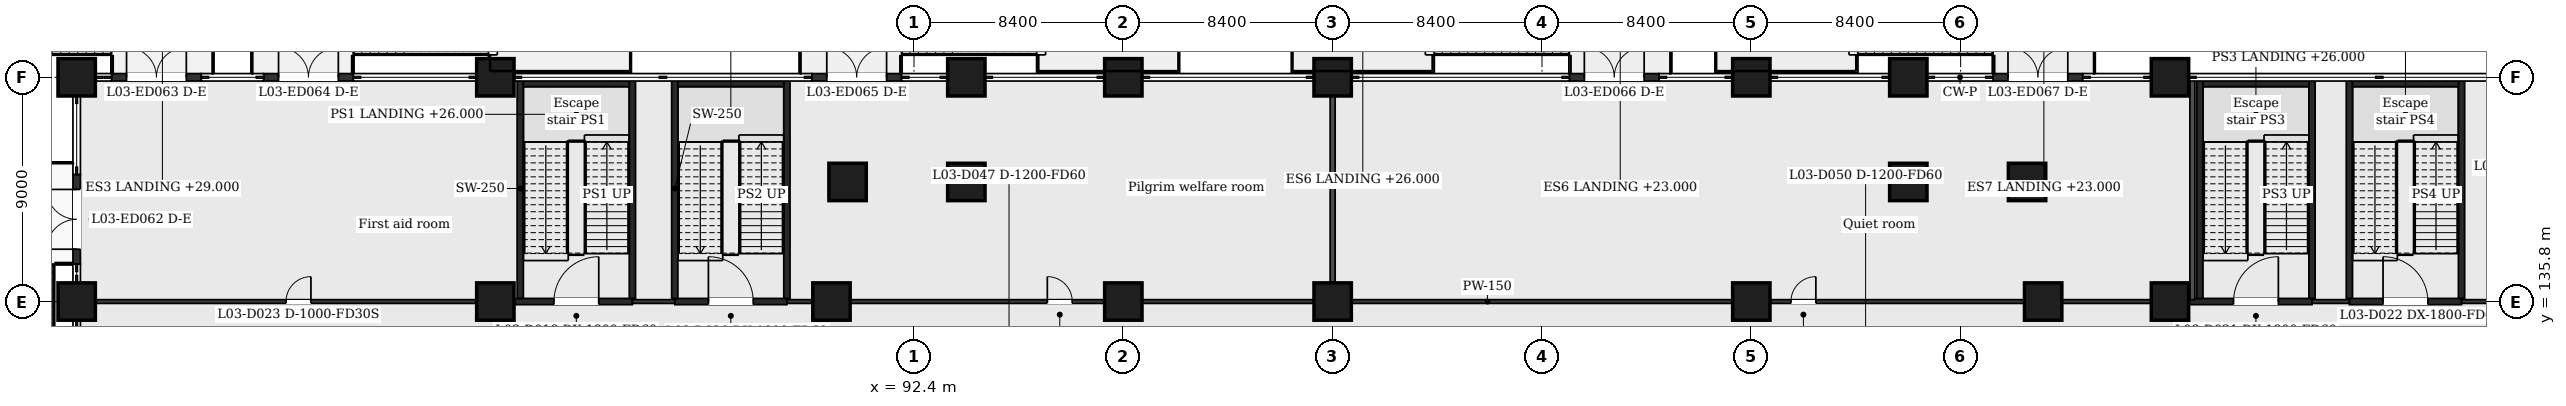
"""IFC4 building model, lengths in metres.
Left out: names, types, materials, properties, quantities, classifications, styles, units other than length and angle.
Written with IfcOpenShell. Run it as: python <this file> out.ifc"""

import sys

from ifc_helpers import new_model, si_unit, direction, frame, frame_2d, origin, origin_2d, place, context, subcontext, project, spatial, rectangle, extrude, element, fill, save


model = new_model("IFC4")
c1 = context("Model", 3, precision=1e-05, world=origin(), true_north=direction((0.0, 1.0)))
c2 = subcontext(c1, "Body", "Model", "MODEL_VIEW")
j1 = project(units=[si_unit("LENGTHUNIT", "METRE"), si_unit("PLANEANGLEUNIT", "RADIAN")], contexts=[c1])
p1 = place(None, origin())
s1 = spatial("IfcSite", under=j1, at=p1, CompositionType="ELEMENT")
p2 = place(p1, origin())
s2 = spatial("IfcBuilding", under=s1, at=p2, CompositionType="ELEMENT")
p3 = place(p2, frame((0.0, 0.0, 23.0)))
s3 = spatial("IfcBuildingStorey", under=s2, at=p3, CompositionType="ELEMENT", Elevation=23.0)
for number, where, z_axis, x_axis in (
    (1, (58.8, 135.8, 0.0), (0.0, 0.0, 1.0), (1.0, 0.0, 0.0)),
    (2, (75.6, 135.8, 0.0), (0.0, 0.0, 1.0), (1.0, 0.0, 0.0)),
    (3, (89.088, 135.8, 0.0), (0.0, 0.0, 1.0), (1.0, 0.0, 0.0)),
    (4, (100.8, 135.8, 0.0), (0.0, 0.0, 1.0), (1.0, 0.0, 0.0)),
    (5, (109.2, 135.8, 0.0), (0.0, 0.0, 1.0), (1.0, 0.0, 0.0)),
    (6, (126.0, 135.8, 0.0), (0.0, 0.0, 1.0), (1.0, 0.0, 0.0)),
    (7, (137.711, 135.8, 0.0), (0.0, 0.0, 1.0), (1.0, 0.0, 0.0)),
    (8, (142.8, 135.8, 0.0), (0.0, 0.0, 1.0), (1.0, 0.0, 0.0)),
    (9, (89.735, 140.6, 0.0), (0.0, 0.0, 1.0), (1.0, 0.0, 0.0)),
    (10, (94.5, 140.6, 0.0), (0.0, 0.0, 1.0), (1.0, 0.0, 0.0)),
    (11, (132.3, 140.6, 0.0), (0.0, 0.0, 1.0), (1.0, 0.0, 0.0)),
    (12, (137.065, 140.6, 0.0), (0.0, 0.0, 1.0), (1.0, 0.0, 0.0)),
    (13, (58.8, 144.8, 0.0), (0.0, 0.0, 1.0), (1.0, 0.0, 0.0)),
    (14, (75.6, 144.8, 0.0), (0.0, 0.0, 1.0), (1.0, 0.0, 0.0)),
    (15, (94.5, 144.8, 0.0), (0.0, 0.0, 1.0), (1.0, 0.0, 0.0)),
    (16, (100.8, 144.8, 0.0), (0.0, 0.0, 1.0), (1.0, 0.0, 0.0)),
    (17, (109.2, 144.8, 0.0), (0.0, 0.0, 1.0), (1.0, 0.0, 0.0)),
    (18, (126.0, 144.8, 0.0), (0.0, 0.0, 1.0), (1.0, 0.0, 0.0)),
    (19, (132.3, 144.8, 0.0), (0.0, 0.0, 1.0), (1.0, 0.0, 0.0)),
    (20, (142.8, 144.8, 0.0), (0.0, 0.0, 1.0), (1.0, 0.0, 0.0)),
):
    element("IfcColumn", number, at=place(p3, frame(where, z_axis=z_axis, x_axis=x_axis)), inside=s3, PredefinedType="COLUMN", context=c2, shape_type="SweptSolid", body=[
        extrude(rectangle(XDim=1.5, YDim=1.5, at=origin_2d()), origin(), (0.0, 0.0, 1.0), 6.0),
    ])
p4 = place(p3, frame((58.8, 137.3, 0.0), z_axis=(0.0, 0.0, 1.0), x_axis=(0.0, 1.0, 0.0)))
e21 = element("IfcWall", 21, at=p4, inside=s3, PredefinedType="SOLIDWALL", context=c2, shape_type="SweptSolid", body=[
    extrude(rectangle(XDim=3.6, YDim=0.3, at=frame_2d((1.8, 0.0))), origin(), (0.0, 0.0, 1.0), 5.1),
])
p5 = place(p4, frame((0.6, 0.0, 0.0)))
e22 = element("IfcOpeningElement", 22, at=p5, cuts=e21, PredefinedType="OPENING", context=c2, shape_type="SweptSolid", body=[
    extrude(rectangle(XDim=2.4, YDim=2.4, at=frame_2d((1.2, 1.2))), frame((0.0, 0.16, 0.0), z_axis=(0.0, -1.0, 0.0), x_axis=(1.0, 0.0, 0.0)), (0.0, 0.0, 1.0), 0.32),
])
p6 = place(p3, frame((60.2, 144.8, 0.0), z_axis=(0.0, 0.0, 1.0), x_axis=(1.0, 0.0, 0.0)))
e23 = element("IfcWall", 23, at=p6, inside=s3, PredefinedType="SOLIDWALL", context=c2, shape_type="SweptSolid", body=[
    extrude(rectangle(XDim=3.6, YDim=0.3, at=frame_2d((1.8, 0.0))), origin(), (0.0, 0.0, 1.0), 5.1),
])
p7 = place(p6, frame((0.6, 0.0, 0.0)))
e24 = element("IfcOpeningElement", 24, at=p7, cuts=e23, PredefinedType="OPENING", context=c2, shape_type="SweptSolid", body=[
    extrude(rectangle(XDim=2.4, YDim=2.4, at=frame_2d((1.2, 1.2))), frame((0.0, 0.16, 0.0), z_axis=(0.0, -1.0, 0.0), x_axis=(1.0, 0.0, 0.0)), (0.0, 0.0, 1.0), 0.32),
])
p8 = place(p3, frame((66.3, 144.8, 0.0), z_axis=(0.0, 0.0, 1.0), x_axis=(1.0, 0.0, 0.0)))
e25 = element("IfcWall", 25, at=p8, inside=s3, PredefinedType="SOLIDWALL", context=c2, shape_type="SweptSolid", body=[
    extrude(rectangle(XDim=3.6, YDim=0.3, at=frame_2d((1.8, 0.0))), origin(), (0.0, 0.0, 1.0), 5.1),
])
p9 = place(p8, frame((0.6, 0.0, 0.0)))
e26 = element("IfcOpeningElement", 26, at=p9, cuts=e25, PredefinedType="OPENING", context=c2, shape_type="SweptSolid", body=[
    extrude(rectangle(XDim=2.4, YDim=2.4, at=frame_2d((1.2, 1.2))), frame((0.0, 0.16, 0.0), z_axis=(0.0, -1.0, 0.0), x_axis=(1.0, 0.0, 0.0)), (0.0, 0.0, 1.0), 0.32),
])
p10 = place(p3, frame((88.3, 144.8, 0.0), z_axis=(0.0, 0.0, 1.0), x_axis=(1.0, 0.0, 0.0)))
e27 = element("IfcWall", 27, at=p10, inside=s3, PredefinedType="SOLIDWALL", context=c2, shape_type="SweptSolid", body=[
    extrude(rectangle(XDim=3.6, YDim=0.3, at=frame_2d((1.8, 0.0))), origin(), (0.0, 0.0, 1.0), 5.1),
])
p11 = place(p10, frame((0.6, 0.0, 0.0)))
e28 = element("IfcOpeningElement", 28, at=p11, cuts=e27, PredefinedType="OPENING", context=c2, shape_type="SweptSolid", body=[
    extrude(rectangle(XDim=2.4, YDim=2.4, at=frame_2d((1.2, 1.2))), frame((0.0, 0.16, 0.0), z_axis=(0.0, -1.0, 0.0), x_axis=(1.0, 0.0, 0.0)), (0.0, 0.0, 1.0), 0.32),
])
p12 = place(p3, frame((118.7, 144.8, 0.0), z_axis=(0.0, 0.0, 1.0), x_axis=(1.0, 0.0, 0.0)))
e29 = element("IfcWall", 29, at=p12, inside=s3, PredefinedType="SOLIDWALL", context=c2, shape_type="SweptSolid", body=[
    extrude(rectangle(XDim=3.6, YDim=0.3, at=frame_2d((1.8, 0.0))), origin(), (0.0, 0.0, 1.0), 5.1),
])
p13 = place(p12, frame((0.6, 0.0, 0.0)))
e30 = element("IfcOpeningElement", 30, at=p13, cuts=e29, PredefinedType="OPENING", context=c2, shape_type="SweptSolid", body=[
    extrude(rectangle(XDim=2.4, YDim=2.4, at=frame_2d((1.2, 1.2))), frame((0.0, 0.16, 0.0), z_axis=(0.0, -1.0, 0.0), x_axis=(1.0, 0.0, 0.0)), (0.0, 0.0, 1.0), 0.32),
])
p14 = place(p3, frame((135.7, 144.8, 0.0), z_axis=(0.0, 0.0, 1.0), x_axis=(1.0, 0.0, 0.0)))
e31 = element("IfcWall", 31, at=p14, inside=s3, PredefinedType="SOLIDWALL", context=c2, shape_type="SweptSolid", body=[
    extrude(rectangle(XDim=3.6, YDim=0.3, at=frame_2d((1.8, 0.0))), origin(), (0.0, 0.0, 1.0), 5.1),
])
p15 = place(p14, frame((0.6, 0.0, 0.0)))
e32 = element("IfcOpeningElement", 32, at=p15, cuts=e31, PredefinedType="OPENING", context=c2, shape_type="SweptSolid", body=[
    extrude(rectangle(XDim=2.4, YDim=2.4, at=frame_2d((1.2, 1.2))), frame((0.0, 0.16, 0.0), z_axis=(0.0, -1.0, 0.0), x_axis=(1.0, 0.0, 0.0)), (0.0, 0.0, 1.0), 0.32),
])
p16 = place(p3, frame((76.32, 135.8, 0.0), z_axis=(0.0, 0.0, 1.0), x_axis=(1.0, 0.0, 0.0)))
e33 = element("IfcWall", 33, at=p16, inside=s3, PredefinedType="PARTITIONING", context=c2, shape_type="SweptSolid", body=[
    extrude(rectangle(XDim=4.78, YDim=0.25, at=frame_2d((2.39, 0.0))), origin(), (0.0, 0.0, 1.0), 5.5),
])
p17 = place(p16, frame((1.63, 0.0, 0.0)))
e34 = element("IfcOpeningElement", 34, at=p17, cuts=e33, PredefinedType="OPENING", context=c2, shape_type="SweptSolid", body=[
    extrude(rectangle(XDim=1.8, YDim=2.1, at=frame_2d((0.9, 1.05))), frame((0.0, 0.135, 0.0), z_axis=(0.0, -1.0, 0.0), x_axis=(1.0, 0.0, 0.0)), (0.0, 0.0, 1.0), 0.27),
])
p18 = place(p3, frame((82.8, 135.8, 0.0), z_axis=(0.0, 0.0, 1.0), x_axis=(1.0, 0.0, 0.0)))
e35 = element("IfcWall", 35, at=p18, inside=s3, PredefinedType="PARTITIONING", context=c2, shape_type="SweptSolid", body=[
    extrude(rectangle(XDim=4.5, YDim=0.25, at=frame_2d((2.25, 0.0))), origin(), (0.0, 0.0, 1.0), 5.5),
])
p19 = place(p18, frame((1.35, 0.0, 0.0)))
e36 = element("IfcOpeningElement", 36, at=p19, cuts=e35, PredefinedType="OPENING", context=c2, shape_type="SweptSolid", body=[
    extrude(rectangle(XDim=1.8, YDim=2.1, at=frame_2d((0.9, 1.05))), frame((0.0, 0.135, 0.0), z_axis=(0.0, -1.0, 0.0), x_axis=(1.0, 0.0, 0.0)), (0.0, 0.0, 1.0), 0.27),
])
p20 = place(p3, frame((143.52, 135.8, 0.0), z_axis=(0.0, 0.0, 1.0), x_axis=(1.0, 0.0, 0.0)))
e37 = element("IfcWall", 37, at=p20, inside=s3, PredefinedType="PARTITIONING", context=c2, shape_type="SweptSolid", body=[
    extrude(rectangle(XDim=4.98, YDim=0.25, at=frame_2d((2.49, 0.0))), origin(), (0.0, 0.0, 1.0), 5.5),
])
p21 = place(p20, frame((1.83, 0.0, 0.0)))
e38 = element("IfcOpeningElement", 38, at=p21, cuts=e37, PredefinedType="OPENING", context=c2, shape_type="SweptSolid", body=[
    extrude(rectangle(XDim=1.8, YDim=2.1, at=frame_2d((0.9, 1.05))), frame((0.0, 0.135, 0.0), z_axis=(0.0, -1.0, 0.0), x_axis=(1.0, 0.0, 0.0)), (0.0, 0.0, 1.0), 0.27),
])
p22 = place(p3, frame((150.0, 135.8, 0.0), z_axis=(0.0, 0.0, 1.0), x_axis=(1.0, 0.0, 0.0)))
e39 = element("IfcWall", 39, at=p22, inside=s3, PredefinedType="PARTITIONING", context=c2, shape_type="SweptSolid", body=[
    extrude(rectangle(XDim=4.5, YDim=0.25, at=frame_2d((2.25, 0.0))), origin(), (0.0, 0.0, 1.0), 5.5),
])
p23 = place(p22, frame((1.35, 0.0, 0.0)))
e40 = element("IfcOpeningElement", 40, at=p23, cuts=e39, PredefinedType="OPENING", context=c2, shape_type="SweptSolid", body=[
    extrude(rectangle(XDim=1.8, YDim=2.1, at=frame_2d((0.9, 1.05))), frame((0.0, 0.135, 0.0), z_axis=(0.0, -1.0, 0.0), x_axis=(1.0, 0.0, 0.0)), (0.0, 0.0, 1.0), 0.27),
])
p24 = place(p3, frame((58.85, 135.8, 0.0), z_axis=(0.0, 0.0, 1.0), x_axis=(1.0, 0.0, 0.0)))
e41 = element("IfcWall", 41, at=p24, inside=s3, PredefinedType="PARTITIONING", context=c2, shape_type="SweptSolid", body=[
    extrude(rectangle(XDim=17.47, YDim=0.15, at=frame_2d((8.735, 0.0))), origin(), (0.0, 0.0, 1.0), 5.5),
])
p25 = place(p24, frame((8.35, 0.0, 0.0)))
e42 = element("IfcOpeningElement", 42, at=p25, cuts=e41, PredefinedType="OPENING", context=c2, shape_type="SweptSolid", body=[
    extrude(rectangle(XDim=1.0, YDim=2.1, at=frame_2d((0.5, 1.05))), frame((0.0, 0.085, 0.0), z_axis=(0.0, -1.0, 0.0), x_axis=(1.0, 0.0, 0.0)), (0.0, 0.0, 1.0), 0.17),
])
p26 = place(p3, frame((81.1, 135.8, 0.0), z_axis=(0.0, 0.0, 1.0), x_axis=(1.0, 0.0, 0.0)))
e43 = element("IfcWall", 43, at=p26, inside=s3, PredefinedType="PARTITIONING", context=c2, shape_type="SweptSolid", body=[
    extrude(rectangle(XDim=1.7, YDim=0.15, at=frame_2d((0.85, 0.0))), origin(), (0.0, 0.0, 1.0), 5.5),
])
p27 = place(p3, frame((87.3, 135.8, 0.0), z_axis=(0.0, 0.0, 1.0), x_axis=(1.0, 0.0, 0.0)))
e44 = element("IfcWall", 44, at=p27, inside=s3, PredefinedType="PARTITIONING", context=c2, shape_type="SweptSolid", body=[
    extrude(rectangle(XDim=56.22, YDim=0.15, at=frame_2d((28.11, 0.0))), origin(), (0.0, 0.0, 1.0), 5.5),
])
p28 = place(p27, frame((10.45, 0.0, 0.0)))
e45 = element("IfcOpeningElement", 45, at=p28, cuts=e44, PredefinedType="OPENING", context=c2, shape_type="SweptSolid", body=[
    extrude(rectangle(XDim=1.0, YDim=2.1, at=frame_2d((0.5, 1.05))), frame((0.0, 0.085, 0.0), z_axis=(0.0, -1.0, 0.0), x_axis=(1.0, 0.0, 0.0)), (0.0, 0.0, 1.0), 0.17),
])
p29 = place(p27, frame((40.29, 0.0, 0.0)))
e46 = element("IfcOpeningElement", 46, at=p29, cuts=e44, PredefinedType="OPENING", context=c2, shape_type="SweptSolid", body=[
    extrude(rectangle(XDim=1.0, YDim=2.1, at=frame_2d((0.5, 1.05))), frame((0.0, 0.085, 0.0), z_axis=(0.0, -1.0, 0.0), x_axis=(1.0, 0.0, 0.0)), (0.0, 0.0, 1.0), 0.17),
])
p30 = place(p3, frame((148.5, 135.8, 0.0), z_axis=(0.0, 0.0, 1.0), x_axis=(1.0, 0.0, 0.0)))
e47 = element("IfcWall", 47, at=p30, inside=s3, PredefinedType="PARTITIONING", context=c2, shape_type="SweptSolid", body=[
    extrude(rectangle(XDim=1.5, YDim=0.15, at=frame_2d((0.75, 0.0))), origin(), (0.0, 0.0, 1.0), 5.5),
])
p31 = place(p3, frame((154.5, 135.8, 0.0), z_axis=(0.0, 0.0, 1.0), x_axis=(1.0, 0.0, 0.0)))
e48 = element("IfcWall", 48, at=p31, inside=s3, PredefinedType="PARTITIONING", context=c2, shape_type="SweptSolid", body=[
    extrude(rectangle(XDim=5.05, YDim=0.15, at=frame_2d((2.525, 0.0))), origin(), (0.0, 0.0, 1.0), 5.5),
])
for number, where, z_axis, x_axis in (
    (49, (76.6, 135.925, 0.0), (0.0, 0.0, 1.0), (0.0, 1.0, 0.0)),
    (50, (81.1, 135.925, 0.0), (0.0, 0.0, 1.0), (0.0, 1.0, 0.0)),
    (51, (82.8, 135.925, 0.0), (0.0, 0.0, 1.0), (0.0, 1.0, 0.0)),
    (52, (87.3, 135.925, 0.0), (0.0, 0.0, 1.0), (0.0, 1.0, 0.0)),
):
    element("IfcWall", number, at=place(p3, frame(where, z_axis=z_axis, x_axis=x_axis)), inside=s3, PredefinedType="PARTITIONING", context=c2, shape_type="SweptSolid", body=[
        extrude(rectangle(XDim=8.825, YDim=0.25, at=frame_2d((4.413, 0.0))), origin(), (0.0, 0.0, 1.0), 5.5),
    ])
for number, where, z_axis, x_axis in (
    (53, (109.2, 135.875, 0.0), (0.0, 0.0, 1.0), (0.0, 1.0, 0.0)),
    (54, (143.7, 135.875, 0.0), (0.0, 0.0, 1.0), (0.0, 1.0, 0.0)),
):
    element("IfcWall", number, at=place(p3, frame(where, z_axis=z_axis, x_axis=x_axis)), inside=s3, PredefinedType="PARTITIONING", context=c2, shape_type="SweptSolid", body=[
        extrude(rectangle(XDim=8.875, YDim=0.2, at=frame_2d((4.438, 0.0))), origin(), (0.0, 0.0, 1.0), 5.5),
    ])
for number, where, z_axis, x_axis in (
    (55, (144.0, 135.925, 0.0), (0.0, 0.0, 1.0), (0.0, 1.0, 0.0)),
    (56, (148.5, 135.925, 0.0), (0.0, 0.0, 1.0), (0.0, 1.0, 0.0)),
    (57, (150.0, 135.925, 0.0), (0.0, 0.0, 1.0), (0.0, 1.0, 0.0)),
    (58, (154.5, 135.925, 0.0), (0.0, 0.0, 1.0), (0.0, 1.0, 0.0)),
):
    element("IfcWall", number, at=place(p3, frame(where, z_axis=z_axis, x_axis=x_axis)), inside=s3, PredefinedType="PARTITIONING", context=c2, shape_type="SweptSolid", body=[
        extrude(rectangle(XDim=8.825, YDim=0.25, at=frame_2d((4.413, 0.0))), origin(), (0.0, 0.0, 1.0), 5.5),
    ])
for number, where, z_axis, x_axis in (
    (59, (76.725, 144.538, 0.0), (0.0, 0.0, 1.0), (1.0, 0.0, 0.0)),
    (60, (82.925, 144.538, 0.0), (0.0, 0.0, 1.0), (1.0, 0.0, 0.0)),
    (61, (144.125, 144.538, 0.0), (0.0, 0.0, 1.0), (1.0, 0.0, 0.0)),
    (62, (150.125, 144.538, 0.0), (0.0, 0.0, 1.0), (1.0, 0.0, 0.0)),
):
    element("IfcWall", number, at=place(p3, frame(where, z_axis=z_axis, x_axis=x_axis)), inside=s3, PredefinedType="PARTITIONING", context=c2, shape_type="SweptSolid", body=[
        extrude(rectangle(XDim=4.25, YDim=0.225, at=frame_2d((2.125, 0.0))), origin(), (0.0, 0.0, 1.0), 5.5),
    ])
p32 = place(p5, origin())
e63 = element("IfcDoor", 63, at=p32, inside=s3, OperationType="DOUBLE_DOOR_DOUBLE_SWING", PredefinedType="DOOR", context=c2, shape_type="SweptSolid", body=[
    extrude(rectangle(XDim=2.4, YDim=2.4, at=frame_2d((1.2, 1.2))), frame((0.0, 0.025, 0.0), z_axis=(0.0, -1.0, 0.0), x_axis=(1.0, 0.0, 0.0)), (0.0, 0.0, 1.0), 0.05),
])
fill(e22, e63)
p33 = place(p7, origin())
e64 = element("IfcDoor", 64, at=p33, inside=s3, OperationType="DOUBLE_DOOR_DOUBLE_SWING", PredefinedType="DOOR", context=c2, shape_type="SweptSolid", body=[
    extrude(rectangle(XDim=2.4, YDim=2.4, at=frame_2d((1.2, 1.2))), frame((0.0, 0.025, 0.0), z_axis=(0.0, -1.0, 0.0), x_axis=(1.0, 0.0, 0.0)), (0.0, 0.0, 1.0), 0.05),
])
fill(e24, e64)
p34 = place(p9, origin())
e65 = element("IfcDoor", 65, at=p34, inside=s3, OperationType="DOUBLE_DOOR_DOUBLE_SWING", PredefinedType="DOOR", context=c2, shape_type="SweptSolid", body=[
    extrude(rectangle(XDim=2.4, YDim=2.4, at=frame_2d((1.2, 1.2))), frame((0.0, 0.025, 0.0), z_axis=(0.0, -1.0, 0.0), x_axis=(1.0, 0.0, 0.0)), (0.0, 0.0, 1.0), 0.05),
])
fill(e26, e65)
p35 = place(p11, origin())
e66 = element("IfcDoor", 66, at=p35, inside=s3, OperationType="DOUBLE_DOOR_DOUBLE_SWING", PredefinedType="DOOR", context=c2, shape_type="SweptSolid", body=[
    extrude(rectangle(XDim=2.4, YDim=2.4, at=frame_2d((1.2, 1.2))), frame((0.0, 0.025, 0.0), z_axis=(0.0, -1.0, 0.0), x_axis=(1.0, 0.0, 0.0)), (0.0, 0.0, 1.0), 0.05),
])
fill(e28, e66)
p36 = place(p13, origin())
e67 = element("IfcDoor", 67, at=p36, inside=s3, OperationType="DOUBLE_DOOR_DOUBLE_SWING", PredefinedType="DOOR", context=c2, shape_type="SweptSolid", body=[
    extrude(rectangle(XDim=2.4, YDim=2.4, at=frame_2d((1.2, 1.2))), frame((0.0, 0.025, 0.0), z_axis=(0.0, -1.0, 0.0), x_axis=(1.0, 0.0, 0.0)), (0.0, 0.0, 1.0), 0.05),
])
fill(e30, e67)
p37 = place(p15, origin())
e68 = element("IfcDoor", 68, at=p37, inside=s3, OperationType="DOUBLE_DOOR_DOUBLE_SWING", PredefinedType="DOOR", context=c2, shape_type="SweptSolid", body=[
    extrude(rectangle(XDim=2.4, YDim=2.4, at=frame_2d((1.2, 1.2))), frame((0.0, 0.025, 0.0), z_axis=(0.0, -1.0, 0.0), x_axis=(1.0, 0.0, 0.0)), (0.0, 0.0, 1.0), 0.05),
])
fill(e32, e68)
p38 = place(p17, origin())
e69 = element("IfcDoor", 69, at=p38, inside=s3, OperationType="SINGLE_SWING_RIGHT", PredefinedType="DOOR", context=c2, shape_type="SweptSolid", body=[
    extrude(rectangle(XDim=1.8, YDim=2.1, at=frame_2d((0.9, 1.05))), frame((0.0, 0.025, 0.0), z_axis=(0.0, -1.0, 0.0), x_axis=(1.0, 0.0, 0.0)), (0.0, 0.0, 1.0), 0.05),
])
fill(e34, e69)
p39 = place(p19, origin())
e70 = element("IfcDoor", 70, at=p39, inside=s3, OperationType="SINGLE_SWING_LEFT", PredefinedType="DOOR", context=c2, shape_type="SweptSolid", body=[
    extrude(rectangle(XDim=1.8, YDim=2.1, at=frame_2d((0.9, 1.05))), frame((0.0, 0.025, 0.0), z_axis=(0.0, -1.0, 0.0), x_axis=(1.0, 0.0, 0.0)), (0.0, 0.0, 1.0), 0.05),
])
fill(e36, e70)
p40 = place(p21, origin())
e71 = element("IfcDoor", 71, at=p40, inside=s3, OperationType="SINGLE_SWING_RIGHT", PredefinedType="DOOR", context=c2, shape_type="SweptSolid", body=[
    extrude(rectangle(XDim=1.8, YDim=2.1, at=frame_2d((0.9, 1.05))), frame((0.0, 0.025, 0.0), z_axis=(0.0, -1.0, 0.0), x_axis=(1.0, 0.0, 0.0)), (0.0, 0.0, 1.0), 0.05),
])
fill(e38, e71)
p41 = place(p23, origin())
e72 = element("IfcDoor", 72, at=p41, inside=s3, OperationType="SINGLE_SWING_LEFT", PredefinedType="DOOR", context=c2, shape_type="SweptSolid", body=[
    extrude(rectangle(XDim=1.8, YDim=2.1, at=frame_2d((0.9, 1.05))), frame((0.0, 0.025, 0.0), z_axis=(0.0, -1.0, 0.0), x_axis=(1.0, 0.0, 0.0)), (0.0, 0.0, 1.0), 0.05),
])
fill(e40, e72)
p42 = place(p25, origin())
e73 = element("IfcDoor", 73, at=p42, inside=s3, OperationType="SINGLE_SWING_RIGHT", PredefinedType="DOOR", context=c2, shape_type="SweptSolid", body=[
    extrude(rectangle(XDim=1.0, YDim=2.1, at=frame_2d((0.5, 1.05))), frame((0.0, 0.025, 0.0), z_axis=(0.0, -1.0, 0.0), x_axis=(1.0, 0.0, 0.0)), (0.0, 0.0, 1.0), 0.05),
])
fill(e42, e73)
p43 = place(p28, origin())
e74 = element("IfcDoor", 74, at=p43, inside=s3, OperationType="SINGLE_SWING_LEFT", PredefinedType="DOOR", context=c2, shape_type="SweptSolid", body=[
    extrude(rectangle(XDim=1.0, YDim=2.1, at=frame_2d((0.5, 1.05))), frame((0.0, 0.025, 0.0), z_axis=(0.0, -1.0, 0.0), x_axis=(1.0, 0.0, 0.0)), (0.0, 0.0, 1.0), 0.05),
])
fill(e45, e74)
p44 = place(p29, origin())
e75 = element("IfcDoor", 75, at=p44, inside=s3, OperationType="SINGLE_SWING_RIGHT", PredefinedType="DOOR", context=c2, shape_type="SweptSolid", body=[
    extrude(rectangle(XDim=1.0, YDim=2.1, at=frame_2d((0.5, 1.05))), frame((0.0, 0.025, 0.0), z_axis=(0.0, -1.0, 0.0), x_axis=(1.0, 0.0, 0.0)), (0.0, 0.0, 1.0), 0.05),
])
fill(e46, e75)
save(model, sys.argv[1])
